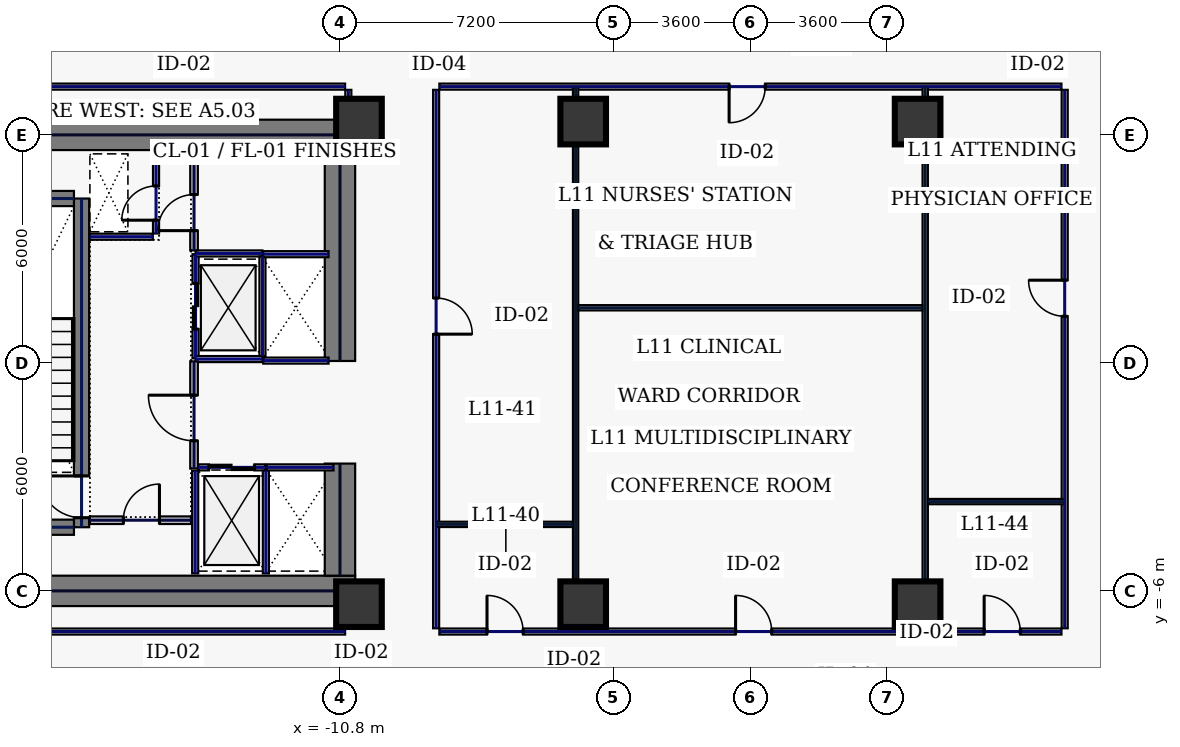
"""IFC4 building model, lengths in metres.
Left out: names, types, materials, properties, quantities, classifications, styles, units other than length and angle.
Written with IfcOpenShell. Run it as: python <this file> out.ifc"""

import sys

from ifc_helpers import new_model, si_unit, direction, frame, frame_2d, origin, origin_2d, place, context, subcontext, project, spatial, rectangle, hollow_rectangle, extrude, element, fill, save


model = new_model("IFC4")
c1 = context("Model", 3, precision=1e-05, world=origin(), true_north=direction((0.0, 1.0)))
c2 = subcontext(c1, "Body", "Model", "MODEL_VIEW")
j1 = project(units=[si_unit("LENGTHUNIT", "METRE"), si_unit("PLANEANGLEUNIT", "RADIAN")], contexts=[c1])
p1 = place(None, origin())
s1 = spatial("IfcSite", under=j1, at=p1, CompositionType="ELEMENT")
p2 = place(p1, origin())
s2 = spatial("IfcBuilding", under=s1, at=p2, CompositionType="ELEMENT")
p3 = place(p2, frame((0.0, 0.0, 55.4)))
s3 = spatial("IfcBuildingStorey", under=s2, at=p3, CompositionType="ELEMENT", Elevation=55.4)
for number, where, z_axis, x_axis in (
    (1, (-22.0, 6.0, 0.0), (0.0, 0.0, 1.0), (1.0, 0.0, 0.0)),
    (2, (-22.0, -6.0, 0.0), (0.0, 0.0, 1.0), (1.0, 0.0, 0.0)),
):
    element("IfcWall", number, at=place(p3, frame(where, z_axis=z_axis, x_axis=x_axis)), inside=s3, PredefinedType="SHEAR", context=c2, shape_type="SweptSolid", body=[
        extrude(rectangle(XDim=11.6, YDim=0.8, at=frame_2d((5.8, 0.0))), origin(), (0.0, 0.0, 1.0), 3.74),
    ])
p4 = place(p3, frame((-10.8, -5.6, 0.0), z_axis=(0.0, 0.0, 1.0), x_axis=(0.0, 1.0, 0.0)))
e3 = element("IfcWall", 3, at=p4, inside=s3, PredefinedType="SHEAR", context=c2, shape_type="SweptSolid", body=[
    extrude(rectangle(XDim=2.95, YDim=0.8, at=frame_2d((1.475, 0.0))), origin(), (0.0, 0.0, 1.0), 3.74),
])
p5 = place(p3, frame((-10.8, 0.05, 0.0), z_axis=(0.0, 0.0, 1.0), x_axis=(0.0, 1.0, 0.0)))
e4 = element("IfcWall", 4, at=p5, inside=s3, PredefinedType="SHEAR", context=c2, shape_type="SweptSolid", body=[
    extrude(rectangle(XDim=5.55, YDim=0.8, at=frame_2d((2.775, 0.0))), origin(), (0.0, 0.0, 1.0), 3.74),
])
p6 = place(p3, frame((-17.6, -4.325, 0.0), z_axis=(0.0, 0.0, 1.0), x_axis=(0.0, 1.0, 0.0)))
e5 = element("IfcWall", 5, at=p6, inside=s3, PredefinedType="SHEAR", context=c2, shape_type="SweptSolid", body=[
    extrude(rectangle(XDim=8.65, YDim=0.4, at=frame_2d((4.325, 0.0))), origin(), (0.0, 0.0, 1.0), 3.74),
])
p7 = place(p6, frame((0.25, 0.0, 0.0)))
e6 = element("IfcOpeningElement", 6, at=p7, cuts=e5, PredefinedType="OPENING", context=c2, shape_type="SweptSolid", body=[
    extrude(rectangle(XDim=1.1, YDim=2.2, at=frame_2d((0.55, 1.1))), frame((0.0, 0.21, 0.0), z_axis=(0.0, -1.0, 0.0), x_axis=(1.0, 0.0, 0.0)), (0.0, 0.0, 1.0), 0.42),
])
for number, where, z_axis, x_axis in (
    (7, (-21.2, -4.325, 0.0), (0.0, 0.0, 1.0), (1.0, 0.0, 0.0)),
    (8, (-21.2, 4.325, 0.0), (0.0, 0.0, 1.0), (1.0, 0.0, 0.0)),
):
    element("IfcWall", number, at=place(p3, frame(where, z_axis=z_axis, x_axis=x_axis)), inside=s3, PredefinedType="SHEAR", context=c2, shape_type="SweptSolid", body=[
        extrude(rectangle(XDim=3.4, YDim=0.4, at=frame_2d((1.7, 0.0))), origin(), (0.0, 0.0, 1.0), 3.74),
    ])
for number, where, z_axis, x_axis in (
    (9, (-10.3, -6.35, 0.0), (0.0, 0.0, 1.0), (1.0, 0.0, 0.0)),
    (10, (-10.3, 6.35, 0.0), (0.0, 0.0, 1.0), (1.0, 0.0, 0.0)),
    (11, (-4.4, -6.35, 0.0), (0.0, 0.0, 1.0), (1.0, 0.0, 0.0)),
    (12, (4.4, -6.35, 0.0), (0.0, 0.0, 1.0), (1.0, 0.0, 0.0)),
    (13, (-4.4, 6.35, 0.0), (0.0, 0.0, 1.0), (1.0, 0.0, 0.0)),
    (14, (4.4, 6.35, 0.0), (0.0, 0.0, 1.0), (1.0, 0.0, 0.0)),
):
    element("IfcColumn", number, at=place(p3, frame(where, z_axis=z_axis, x_axis=x_axis)), inside=s3, PredefinedType="COLUMN", context=c2, shape_type="SweptSolid", body=[
        extrude(hollow_rectangle(XDim=1.2, YDim=1.2, WallThickness=0.05, at=origin_2d()), origin(), (0.0, 0.0, 1.0), 3.74),
    ])
p8 = place(p3, frame((-14.6, 0.12, 0.0), z_axis=(0.0, 0.0, 1.0), x_axis=(0.0, 1.0, 0.0)))
e15 = element("IfcWall", 15, at=p8, inside=s3, PredefinedType="PARTITIONING", context=c2, shape_type="SweptSolid", body=[
    extrude(rectangle(XDim=2.74, YDim=0.16, at=frame_2d((1.37, 0.0))), origin(), (0.0, 0.0, 1.0), 3.74),
])
p9 = place(p8, frame((0.77, 0.0, 0.0)))
e16 = element("IfcOpeningElement", 16, at=p9, cuts=e15, PredefinedType="OPENING", context=c2, shape_type="SweptSolid", body=[
    extrude(rectangle(XDim=1.2, YDim=2.2, at=frame_2d((0.6, 1.1))), frame((0.0, 0.09, 0.0), z_axis=(0.0, -1.0, 0.0), x_axis=(1.0, 0.0, 0.0)), (0.0, 0.0, 1.0), 0.18),
])
for number, where, z_axis, x_axis in (
    (17, (-14.6, 0.1, 0.0), (0.0, 0.0, 1.0), (1.0, 0.0, 0.0)),
    (18, (-14.6, 2.88, 0.0), (0.0, 0.0, 1.0), (1.0, 0.0, 0.0)),
):
    element("IfcWall", number, at=place(p3, frame(where, z_axis=z_axis, x_axis=x_axis)), inside=s3, PredefinedType="PARTITIONING", context=c2, shape_type="SweptSolid", body=[
        extrude(rectangle(XDim=1.76, YDim=0.16, at=frame_2d((0.88, 0.0))), origin(), (0.0, 0.0, 1.0), 3.74),
    ])
p10 = place(p3, frame((-12.84, 0.18, 0.0), z_axis=(0.0, 0.0, 1.0), x_axis=(0.0, 1.0, 0.0)))
e19 = element("IfcWall", 19, at=p10, inside=s3, PredefinedType="PARTITIONING", context=c2, shape_type="SweptSolid", body=[
    extrude(rectangle(XDim=2.62, YDim=0.16, at=frame_2d((1.31, 0.0))), origin(), (0.0, 0.0, 1.0), 3.74),
])
p11 = place(p3, frame((-14.53, -2.75, 0.0), z_axis=(0.0, 0.0, 1.0), x_axis=(1.0, 0.0, 0.0)))
e20 = element("IfcWall", 20, at=p11, inside=s3, PredefinedType="PARTITIONING", context=c2, shape_type="SweptSolid", body=[
    extrude(rectangle(XDim=1.76, YDim=0.16, at=frame_2d((0.88, 0.0))), origin(), (0.0, 0.0, 1.0), 3.74),
])
p12 = place(p11, frame((0.28, 0.0, 0.0)))
e21 = element("IfcOpeningElement", 21, at=p12, cuts=e20, PredefinedType="OPENING", context=c2, shape_type="SweptSolid", body=[
    extrude(rectangle(XDim=1.2, YDim=2.2, at=frame_2d((0.6, 1.1))), frame((0.0, 0.09, 0.0), z_axis=(0.0, -1.0, 0.0), x_axis=(1.0, 0.0, 0.0)), (0.0, 0.0, 1.0), 0.18),
])
for number, where, z_axis, x_axis in (
    (22, (-12.75, -5.54, 0.0), (0.0, 0.0, 1.0), (0.0, 1.0, 0.0)),
    (23, (-14.61, -5.54, 0.0), (0.0, 0.0, 1.0), (0.0, 1.0, 0.0)),
):
    element("IfcWall", number, at=place(p3, frame(where, z_axis=z_axis, x_axis=x_axis)), inside=s3, PredefinedType="PARTITIONING", context=c2, shape_type="SweptSolid", body=[
        extrude(rectangle(XDim=2.7, YDim=0.16, at=frame_2d((1.35, 0.0))), origin(), (0.0, 0.0, 1.0), 3.74),
    ])
p13 = place(p3, frame((-12.73, -2.75, 0.0), z_axis=(0.0, 0.0, 1.0), x_axis=(1.0, 0.0, 0.0)))
e24 = element("IfcWall", 24, at=p13, inside=s3, PredefinedType="PARTITIONING", context=c2, shape_type="SweptSolid", body=[
    extrude(rectangle(XDim=1.76, YDim=0.16, at=frame_2d((0.88, 0.0))), origin(), (0.0, 0.0, 1.0), 3.74),
])
for number, where, z_axis, x_axis in (
    (25, (-12.82, 0.06, 0.0), (0.0, 0.0, 1.0), (1.0, 0.0, 0.0)),
    (26, (-12.82, 2.86, 0.0), (0.0, 0.0, 1.0), (1.0, 0.0, 0.0)),
):
    element("IfcWall", number, at=place(p3, frame(where, z_axis=z_axis, x_axis=x_axis)), inside=s3, PredefinedType="PARTITIONING", context=c2, shape_type="SweptSolid", body=[
        extrude(rectangle(XDim=1.72, YDim=0.16, at=frame_2d((0.86, 0.0))), origin(), (0.0, 0.0, 1.0), 3.74),
    ])
p14 = place(p3, frame((-15.64, 3.405, 0.0), z_axis=(0.0, 0.0, 1.0), x_axis=(0.0, 1.0, 0.0)))
e27 = element("IfcWall", 27, at=p14, inside=s3, PredefinedType="PARTITIONING", context=c2, shape_type="SweptSolid", body=[
    extrude(rectangle(XDim=2.155, YDim=0.16, at=frame_2d((1.078, 0.0))), origin(), (0.0, 0.0, 1.0), 3.74),
])
p15 = place(p14, frame((0.35, 0.0, 0.0)))
e28 = element("IfcOpeningElement", 28, at=p15, cuts=e27, PredefinedType="OPENING", context=c2, shape_type="SweptSolid", body=[
    extrude(rectangle(XDim=0.9, YDim=2.2, at=frame_2d((0.45, 1.1))), frame((0.0, 0.09, 0.0), z_axis=(0.0, -1.0, 0.0), x_axis=(1.0, 0.0, 0.0)), (0.0, 0.0, 1.0), 0.18),
])
p16 = place(p3, frame((-17.38, 3.32, 0.0), z_axis=(0.0, 0.0, 1.0), x_axis=(1.0, 0.0, 0.0)))
e29 = element("IfcWall", 29, at=p16, inside=s3, PredefinedType="PARTITIONING", context=c2, shape_type="SweptSolid", body=[
    extrude(rectangle(XDim=1.655, YDim=0.16, at=frame_2d((0.827, 0.0))), origin(), (0.0, 0.0, 1.0), 3.74),
])
p17 = place(p3, frame((-17.38, -4.14, 0.0), z_axis=(0.0, 0.0, 1.0), x_axis=(1.0, 0.0, 0.0)))
e30 = element("IfcWall", 30, at=p17, inside=s3, PredefinedType="SOLIDWALL", context=c2, shape_type="SweptSolid", body=[
    extrude(rectangle(XDim=2.66, YDim=0.2, at=frame_2d((1.33, 0.0))), origin(), (0.0, 0.0, 1.0), 3.74),
])
p18 = place(p17, frame((0.88, 0.0, 0.0)))
e31 = element("IfcOpeningElement", 31, at=p18, cuts=e30, PredefinedType="OPENING", context=c2, shape_type="SweptSolid", body=[
    extrude(rectangle(XDim=0.95, YDim=2.2, at=frame_2d((0.475, 1.1))), frame((0.0, 0.11, 0.0), z_axis=(0.0, -1.0, 0.0), x_axis=(1.0, 0.0, 0.0)), (0.0, 0.0, 1.0), 0.22),
])
p19 = place(p3, frame((-14.64, 2.96, 0.0), z_axis=(0.0, 0.0, 1.0), x_axis=(0.0, 1.0, 0.0)))
e32 = element("IfcWall", 32, at=p19, inside=s3, PredefinedType="SOLIDWALL", context=c2, shape_type="SweptSolid", body=[
    extrude(rectangle(XDim=2.6, YDim=0.2, at=frame_2d((1.3, 0.0))), origin(), (0.0, 0.0, 1.0), 3.74),
])
p20 = place(p19, frame((0.52, 0.0, 0.0)))
e33 = element("IfcOpeningElement", 33, at=p20, cuts=e32, PredefinedType="OPENING", context=c2, shape_type="SweptSolid", body=[
    extrude(rectangle(XDim=0.95, YDim=2.2, at=frame_2d((0.475, 1.1))), frame((0.0, 0.11, 0.0), z_axis=(0.0, -1.0, 0.0), x_axis=(1.0, 0.0, 0.0)), (0.0, 0.0, 1.0), 0.22),
])
p21 = place(p3, frame((-14.64, -2.78, 0.0), z_axis=(0.0, 0.0, 1.0), x_axis=(0.0, 1.0, 0.0)))
e34 = element("IfcWall", 34, at=p21, inside=s3, PredefinedType="SOLIDWALL", context=c2, shape_type="SweptSolid", body=[
    extrude(rectangle(XDim=2.82, YDim=0.2, at=frame_2d((1.41, 0.0))), origin(), (0.0, 0.0, 1.0), 3.74),
])
p22 = place(p21, frame((0.73, 0.0, 0.0)))
e35 = element("IfcOpeningElement", 35, at=p22, cuts=e34, PredefinedType="OPENING", context=c2, shape_type="SweptSolid", body=[
    extrude(rectangle(XDim=1.2, YDim=2.2, at=frame_2d((0.6, 1.1))), frame((0.0, 0.11, 0.0), z_axis=(0.0, -1.0, 0.0), x_axis=(1.0, 0.0, 0.0)), (0.0, 0.0, 1.0), 0.22),
])
p23 = place(p3, frame((8.27, -6.985, 0.0), z_axis=(0.0, 0.0, 1.0), x_axis=(0.0, 1.0, 0.0)))
e36 = element("IfcWall", 36, at=p23, inside=s3, PredefinedType="PARTITIONING", context=c2, shape_type="SweptSolid", body=[
    extrude(rectangle(XDim=14.17, YDim=0.16, at=frame_2d((7.085, 0.0))), origin(), (0.0, 0.0, 1.0), 3.74),
])
p24 = place(p23, frame((8.211, 0.0, 0.0)))
e37 = element("IfcOpeningElement", 37, at=p24, cuts=e36, PredefinedType="OPENING", context=c2, shape_type="SweptSolid", body=[
    extrude(rectangle(XDim=0.95, YDim=2.2, at=frame_2d((0.475, 1.1))), frame((0.0, 0.09, 0.0), z_axis=(0.0, -1.0, 0.0), x_axis=(1.0, 0.0, 0.0)), (0.0, 0.0, 1.0), 0.18),
])
p25 = place(p3, frame((8.185, 7.27, 0.0), z_axis=(0.0, 0.0, 1.0), x_axis=(-1.0, 0.0, 0.0)))
e38 = element("IfcWall", 38, at=p25, inside=s3, PredefinedType="PARTITIONING", context=c2, shape_type="SweptSolid", body=[
    extrude(rectangle(XDim=16.37, YDim=0.16, at=frame_2d((8.185, 0.0))), origin(), (0.0, 0.0, 1.0), 3.74),
])
p26 = place(p25, frame((7.795, 0.0, 0.0)))
e39 = element("IfcOpeningElement", 39, at=p26, cuts=e38, PredefinedType="OPENING", context=c2, shape_type="SweptSolid", body=[
    extrude(rectangle(XDim=0.95, YDim=2.2, at=frame_2d((0.475, 1.1))), frame((0.0, 0.09, 0.0), z_axis=(0.0, -1.0, 0.0), x_axis=(1.0, 0.0, 0.0)), (0.0, 0.0, 1.0), 0.18),
])
p27 = place(p3, frame((-8.27, 7.185, 0.0), z_axis=(0.0, 0.0, 1.0), x_axis=(0.0, -1.0, 0.0)))
e40 = element("IfcWall", 40, at=p27, inside=s3, PredefinedType="PARTITIONING", context=c2, shape_type="SweptSolid", body=[
    extrude(rectangle(XDim=14.17, YDim=0.16, at=frame_2d((7.085, 0.0))), origin(), (0.0, 0.0, 1.0), 3.74),
])
p28 = place(p27, frame((5.479, 0.0, 0.0)))
e41 = element("IfcOpeningElement", 41, at=p28, cuts=e40, PredefinedType="OPENING", context=c2, shape_type="SweptSolid", body=[
    extrude(rectangle(XDim=0.95, YDim=2.2, at=frame_2d((0.475, 1.1))), frame((0.0, 0.09, 0.0), z_axis=(0.0, -1.0, 0.0), x_axis=(1.0, 0.0, 0.0)), (0.0, 0.0, 1.0), 0.18),
])
p29 = place(p3, frame((-8.185, -7.07, 0.0), z_axis=(0.0, 0.0, 1.0), x_axis=(1.0, 0.0, 0.0)))
e42 = element("IfcWall", 42, at=p29, inside=s3, PredefinedType="PARTITIONING", context=c2, shape_type="SweptSolid", body=[
    extrude(rectangle(XDim=16.37, YDim=0.16, at=frame_2d((8.185, 0.0))), origin(), (0.0, 0.0, 1.0), 3.74),
])
p30 = place(p29, frame((1.254, 0.0, 0.0)))
e43 = element("IfcOpeningElement", 43, at=p30, cuts=e42, PredefinedType="OPENING", context=c2, shape_type="SweptSolid", body=[
    extrude(rectangle(XDim=0.95, YDim=2.2, at=frame_2d((0.475, 1.1))), frame((0.0, 0.09, 0.0), z_axis=(0.0, -1.0, 0.0), x_axis=(1.0, 0.0, 0.0)), (0.0, 0.0, 1.0), 0.18),
])
p31 = place(p29, frame((7.795, 0.0, 0.0)))
e44 = element("IfcOpeningElement", 44, at=p31, cuts=e42, PredefinedType="OPENING", context=c2, shape_type="SweptSolid", body=[
    extrude(rectangle(XDim=0.95, YDim=2.2, at=frame_2d((0.475, 1.1))), frame((0.0, 0.09, 0.0), z_axis=(0.0, -1.0, 0.0), x_axis=(1.0, 0.0, 0.0)), (0.0, 0.0, 1.0), 0.18),
])
p32 = place(p29, frame((14.336, 0.0, 0.0)))
e45 = element("IfcOpeningElement", 45, at=p32, cuts=e42, PredefinedType="OPENING", context=c2, shape_type="SweptSolid", body=[
    extrude(rectangle(XDim=0.95, YDim=2.2, at=frame_2d((0.475, 1.1))), frame((0.0, 0.09, 0.0), z_axis=(0.0, -1.0, 0.0), x_axis=(1.0, 0.0, 0.0)), (0.0, 0.0, 1.0), 0.18),
])
p33 = place(p3, frame((-10.58, -6.985, 0.0), z_axis=(0.0, 0.0, 1.0), x_axis=(0.0, 1.0, 0.0)))
e46 = element("IfcWall", 46, at=p33, inside=s3, PredefinedType="PARTITIONING", context=c2, shape_type="SweptSolid", body=[
    extrude(rectangle(XDim=0.565, YDim=0.16, at=frame_2d((0.283, 0.0))), origin(), (0.0, 0.0, 1.0), 3.74),
])
p34 = place(p3, frame((-10.58, 6.42, 0.0), z_axis=(0.0, 0.0, 1.0), x_axis=(0.0, 1.0, 0.0)))
e47 = element("IfcWall", 47, at=p34, inside=s3, PredefinedType="PARTITIONING", context=c2, shape_type="SweptSolid", body=[
    extrude(rectangle(XDim=0.765, YDim=0.16, at=frame_2d((0.383, 0.0))), origin(), (0.0, 0.0, 1.0), 3.74),
])
for number, where, z_axis, x_axis in (
    (48, (-10.665, 7.27, 0.0), (0.0, 0.0, 1.0), (-1.0, 0.0, 0.0)),
    (49, (-27.185, -7.07, 0.0), (0.0, 0.0, 1.0), (1.0, 0.0, 0.0)),
):
    element("IfcWall", number, at=place(p3, frame(where, z_axis=z_axis, x_axis=x_axis)), inside=s3, PredefinedType="PARTITIONING", context=c2, shape_type="SweptSolid", body=[
        extrude(rectangle(XDim=16.52, YDim=0.16, at=frame_2d((8.26, 0.0))), origin(), (0.0, 0.0, 1.0), 3.74),
    ])
for number, where, z_axis, x_axis in (
    (50, (-4.6, -7.065, 0.0), (0.0, 0.0, 1.0), (0.0, 1.0, 0.0)),
    (51, (4.6, -7.065, 0.0), (0.0, 0.0, 1.0), (0.0, 1.0, 0.0)),
):
    element("IfcWall", number, at=place(p3, frame(where, z_axis=z_axis, x_axis=x_axis)), inside=s3, PredefinedType="PARTITIONING", context=c2, shape_type="SweptSolid", body=[
        extrude(rectangle(XDim=14.33, YDim=0.14, at=frame_2d((7.165, 0.0))), origin(), (0.0, 0.0, 1.0), 2.935),
    ])
p35 = place(p3, frame((-4.525, 1.45, 0.0), z_axis=(0.0, 0.0, 1.0), x_axis=(1.0, 0.0, 0.0)))
e52 = element("IfcWall", 52, at=p35, inside=s3, PredefinedType="PARTITIONING", context=c2, shape_type="SweptSolid", body=[
    extrude(rectangle(XDim=9.05, YDim=0.14, at=frame_2d((4.525, 0.0))), origin(), (0.0, 0.0, 1.0), 3.74),
])
for number, where, z_axis, x_axis in (
    (53, (-8.265, -4.25, 0.0), (0.0, 0.0, 1.0), (1.0, 0.0, 0.0)),
    (54, (4.675, -3.65, 0.0), (0.0, 0.0, 1.0), (1.0, 0.0, 0.0)),
):
    element("IfcWall", number, at=place(p3, frame(where, z_axis=z_axis, x_axis=x_axis)), inside=s3, PredefinedType="PARTITIONING", context=c2, shape_type="SweptSolid", body=[
        extrude(rectangle(XDim=3.59, YDim=0.14, at=frame_2d((1.795, 0.0))), origin(), (0.0, 0.0, 1.0), 3.74),
    ])
p36 = place(p7, origin())
e55 = element("IfcDoor", 55, at=p36, inside=s3, OperationType="SINGLE_SWING_RIGHT", PredefinedType="DOOR", context=c2, shape_type="SweptSolid", body=[
    extrude(rectangle(XDim=1.1, YDim=2.2, at=frame_2d((0.55, 1.1))), frame((0.0, 0.025, 0.0), z_axis=(0.0, -1.0, 0.0), x_axis=(1.0, 0.0, 0.0)), (0.0, 0.0, 1.0), 0.05),
])
fill(e6, e55)
p37 = place(p9, origin())
e56 = element("IfcDoor", 56, at=p37, inside=s3, OperationType="SLIDING_TO_LEFT", PredefinedType="DOOR", context=c2, shape_type="SweptSolid", body=[
    extrude(rectangle(XDim=1.2, YDim=2.2, at=frame_2d((0.6, 1.1))), frame((0.0, 0.025, 0.0), z_axis=(0.0, -1.0, 0.0), x_axis=(1.0, 0.0, 0.0)), (0.0, 0.0, 1.0), 0.05),
])
fill(e16, e56)
p38 = place(p12, origin())
e57 = element("IfcDoor", 57, at=p38, inside=s3, OperationType="SLIDING_TO_LEFT", PredefinedType="DOOR", context=c2, shape_type="SweptSolid", body=[
    extrude(rectangle(XDim=1.2, YDim=2.2, at=frame_2d((0.6, 1.1))), frame((0.0, 0.025, 0.0), z_axis=(0.0, -1.0, 0.0), x_axis=(1.0, 0.0, 0.0)), (0.0, 0.0, 1.0), 0.05),
])
fill(e21, e57)
p39 = place(p15, origin())
e58 = element("IfcDoor", 58, at=p39, inside=s3, OperationType="SINGLE_SWING_LEFT", PredefinedType="DOOR", context=c2, shape_type="SweptSolid", body=[
    extrude(rectangle(XDim=0.9, YDim=2.2, at=frame_2d((0.45, 1.1))), frame((0.0, 0.025, 0.0), z_axis=(0.0, -1.0, 0.0), x_axis=(1.0, 0.0, 0.0)), (0.0, 0.0, 1.0), 0.05),
])
fill(e28, e58)
p40 = place(p18, origin())
e59 = element("IfcDoor", 59, at=p40, inside=s3, OperationType="SINGLE_SWING_RIGHT", PredefinedType="DOOR", context=c2, shape_type="SweptSolid", body=[
    extrude(rectangle(XDim=0.95, YDim=2.2, at=frame_2d((0.475, 1.1))), frame((0.0, 0.025, 0.0), z_axis=(0.0, -1.0, 0.0), x_axis=(1.0, 0.0, 0.0)), (0.0, 0.0, 1.0), 0.05),
])
fill(e31, e59)
p41 = place(p20, origin())
e60 = element("IfcDoor", 60, at=p41, inside=s3, OperationType="SINGLE_SWING_LEFT", PredefinedType="DOOR", context=c2, shape_type="SweptSolid", body=[
    extrude(rectangle(XDim=0.95, YDim=2.2, at=frame_2d((0.475, 1.1))), frame((0.0, 0.025, 0.0), z_axis=(0.0, -1.0, 0.0), x_axis=(1.0, 0.0, 0.0)), (0.0, 0.0, 1.0), 0.05),
])
fill(e33, e60)
p42 = place(p22, origin())
e61 = element("IfcDoor", 61, at=p42, inside=s3, OperationType="SINGLE_SWING_RIGHT", PredefinedType="DOOR", context=c2, shape_type="SweptSolid", body=[
    extrude(rectangle(XDim=1.2, YDim=2.2, at=frame_2d((0.6, 1.1))), frame((0.0, 0.025, 0.0), z_axis=(0.0, -1.0, 0.0), x_axis=(1.0, 0.0, 0.0)), (0.0, 0.0, 1.0), 0.05),
])
fill(e35, e61)
p43 = place(p30, origin())
e62 = element("IfcDoor", 62, at=p43, inside=s3, OperationType="SINGLE_SWING_LEFT", PredefinedType="DOOR", context=c2, shape_type="SweptSolid", body=[
    extrude(rectangle(XDim=0.95, YDim=2.2, at=frame_2d((0.475, 1.1))), frame((0.0, 0.025, 0.0), z_axis=(0.0, -1.0, 0.0), x_axis=(1.0, 0.0, 0.0)), (0.0, 0.0, 1.0), 0.05),
])
fill(e43, e62)
p44 = place(p28, origin())
e63 = element("IfcDoor", 63, at=p44, inside=s3, OperationType="SINGLE_SWING_RIGHT", PredefinedType="DOOR", context=c2, shape_type="SweptSolid", body=[
    extrude(rectangle(XDim=0.95, YDim=2.2, at=frame_2d((0.475, 1.1))), frame((0.0, 0.025, 0.0), z_axis=(0.0, -1.0, 0.0), x_axis=(1.0, 0.0, 0.0)), (0.0, 0.0, 1.0), 0.05),
])
fill(e41, e63)
p45 = place(p31, origin())
e64 = element("IfcDoor", 64, at=p45, inside=s3, OperationType="SINGLE_SWING_LEFT", PredefinedType="DOOR", context=c2, shape_type="SweptSolid", body=[
    extrude(rectangle(XDim=0.95, YDim=2.2, at=frame_2d((0.475, 1.1))), frame((0.0, 0.025, 0.0), z_axis=(0.0, -1.0, 0.0), x_axis=(1.0, 0.0, 0.0)), (0.0, 0.0, 1.0), 0.05),
])
fill(e44, e64)
p46 = place(p26, origin())
e65 = element("IfcDoor", 65, at=p46, inside=s3, OperationType="SINGLE_SWING_RIGHT", PredefinedType="DOOR", context=c2, shape_type="SweptSolid", body=[
    extrude(rectangle(XDim=0.95, YDim=2.2, at=frame_2d((0.475, 1.1))), frame((0.0, 0.025, 0.0), z_axis=(0.0, -1.0, 0.0), x_axis=(1.0, 0.0, 0.0)), (0.0, 0.0, 1.0), 0.05),
])
fill(e39, e65)
p47 = place(p32, origin())
e66 = element("IfcDoor", 66, at=p47, inside=s3, OperationType="SINGLE_SWING_LEFT", PredefinedType="DOOR", context=c2, shape_type="SweptSolid", body=[
    extrude(rectangle(XDim=0.95, YDim=2.2, at=frame_2d((0.475, 1.1))), frame((0.0, 0.025, 0.0), z_axis=(0.0, -1.0, 0.0), x_axis=(1.0, 0.0, 0.0)), (0.0, 0.0, 1.0), 0.05),
])
fill(e45, e66)
p48 = place(p24, origin())
e67 = element("IfcDoor", 67, at=p48, inside=s3, OperationType="SINGLE_SWING_RIGHT", PredefinedType="DOOR", context=c2, shape_type="SweptSolid", body=[
    extrude(rectangle(XDim=0.95, YDim=2.2, at=frame_2d((0.475, 1.1))), frame((0.0, 0.025, 0.0), z_axis=(0.0, -1.0, 0.0), x_axis=(1.0, 0.0, 0.0)), (0.0, 0.0, 1.0), 0.05),
])
fill(e37, e67)
save(model, sys.argv[1])
